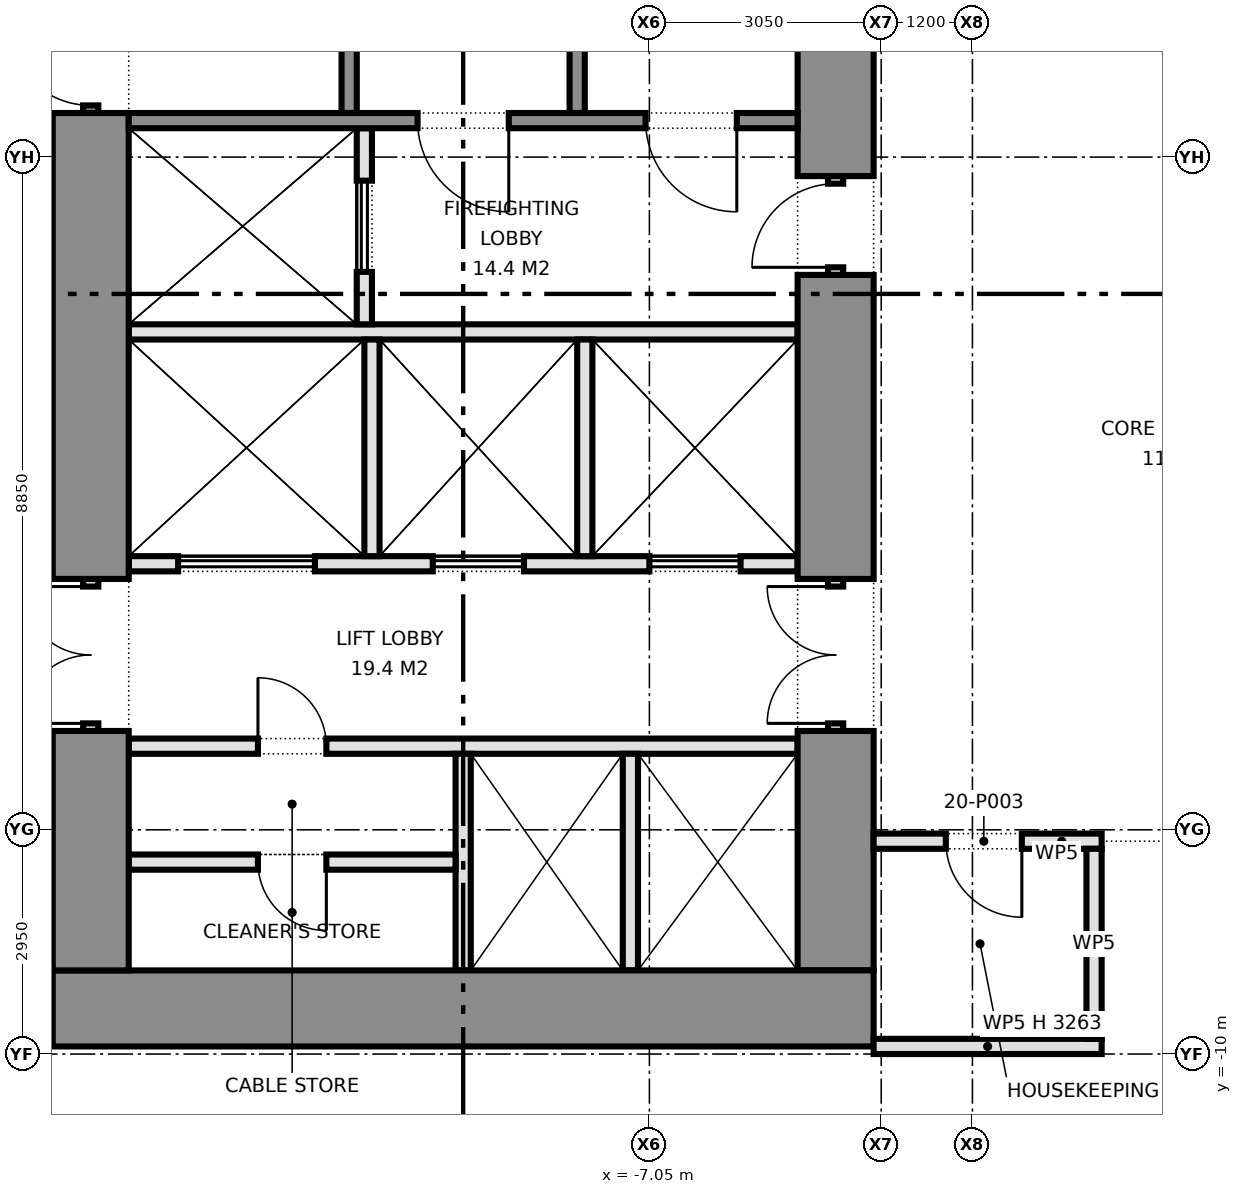
"""IFC4 building model, lengths in metres.
Left out: names, types, materials, properties, quantities, classifications, styles, units other than length and angle.
Written with IfcOpenShell. Run it as: python <this file> out.ifc"""

import sys

from ifc_helpers import new_model, si_unit, direction, frame, frame_2d, origin, place, context, subcontext, project, spatial, rectangle, extrude, element, fill, save


model = new_model("IFC4")
c1 = context("Model", 3, precision=1e-05, world=origin(), true_north=direction((0.0, 1.0)))
c2 = subcontext(c1, "Body", "Model", "MODEL_VIEW")
j1 = project(units=[si_unit("LENGTHUNIT", "METRE"), si_unit("PLANEANGLEUNIT", "RADIAN")], contexts=[c1])
p1 = place(None, origin())
s1 = spatial("IfcSite", under=j1, at=p1, CompositionType="ELEMENT")
p2 = place(p1, origin())
s2 = spatial("IfcBuilding", under=s1, at=p2, CompositionType="ELEMENT")
p3 = place(p2, frame((0.0, 0.0, 90.8)))
s3 = spatial("IfcBuildingStorey", under=s2, at=p3, CompositionType="ELEMENT", Elevation=90.8)
p4 = place(p3, frame((-14.9, -9.4, 0.0), z_axis=(0.0, 0.0, 1.0), x_axis=(1.0, 0.0, 0.0)))
e1 = element("IfcWall", 1, at=p4, inside=s3, PredefinedType="SHEAR", context=c2, shape_type="SweptSolid", body=[
    extrude(rectangle(XDim=10.8, YDim=1.0, at=frame_2d((5.4, 0.0))), origin(), (0.0, 0.0, 1.0), 4.2),
])
p5 = place(p3, frame((-14.4, -8.9, 0.0), z_axis=(0.0, 0.0, 1.0), x_axis=(0.0, 1.0, 0.0)))
e2 = element("IfcWall", 2, at=p5, inside=s3, PredefinedType="SHEAR", context=c2, shape_type="SweptSolid", body=[
    extrude(rectangle(XDim=3.15, YDim=1.0, at=frame_2d((1.575, 0.0))), origin(), (0.0, 0.0, 1.0), 4.2),
])
p6 = place(p3, frame((-14.4, -5.75, 0.0), z_axis=(0.0, 0.0, 1.0), x_axis=(0.0, 1.0, 0.0)))
e3 = element("IfcWall", 3, at=p6, inside=s3, PredefinedType="PARTITIONING", context=c2, shape_type="SweptSolid", body=[
    extrude(rectangle(XDim=2.0, YDim=0.2, at=frame_2d((1.0, 0.0))), origin(), (0.0, 0.0, 1.0), 2.4),
])
p7 = place(p6, frame((0.1, 0.0, 0.0)))
e4 = element("IfcOpeningElement", 4, at=p7, cuts=e3, PredefinedType="OPENING", context=c2, shape_type="SweptSolid", body=[
    extrude(rectangle(XDim=1.8, YDim=2.1, at=frame_2d((0.9, 1.05))), frame((0.0, 0.11, 0.0), z_axis=(0.0, -1.0, 0.0), x_axis=(1.0, 0.0, 0.0)), (0.0, 0.0, 1.0), 0.22),
])
p8 = place(p3, frame((-14.4, -3.75, 0.0), z_axis=(0.0, 0.0, 1.0), x_axis=(0.0, 1.0, 0.0)))
e5 = element("IfcWall", 5, at=p8, inside=s3, PredefinedType="SHEAR", context=c2, shape_type="SweptSolid", body=[
    extrude(rectangle(XDim=6.13, YDim=1.0, at=frame_2d((3.065, 0.0))), origin(), (0.0, 0.0, 1.0), 4.2),
])
p9 = place(p3, frame((-14.4, 2.38, 0.0), z_axis=(0.0, 0.0, 1.0), x_axis=(0.0, 1.0, 0.0)))
e6 = element("IfcWall", 6, at=p9, inside=s3, PredefinedType="SHEAR", context=c2, shape_type="SweptSolid", body=[
    extrude(rectangle(XDim=1.3, YDim=0.2, at=frame_2d((0.65, 0.0))), origin(), (0.0, 0.0, 1.0), 2.4),
])
p10 = place(p9, frame((0.1, 0.0, 0.0)))
e7 = element("IfcOpeningElement", 7, at=p10, cuts=e6, PredefinedType="OPENING", context=c2, shape_type="SweptSolid", body=[
    extrude(rectangle(XDim=1.1, YDim=2.1, at=frame_2d((0.55, 1.05))), frame((0.0, 0.11, 0.0), z_axis=(0.0, -1.0, 0.0), x_axis=(1.0, 0.0, 0.0)), (0.0, 0.0, 1.0), 0.22),
])
p11 = place(p3, frame((-4.6, -8.9, 0.0), z_axis=(0.0, 0.0, 1.0), x_axis=(0.0, 1.0, 0.0)))
e8 = element("IfcWall", 8, at=p11, inside=s3, PredefinedType="SHEAR", context=c2, shape_type="SweptSolid", body=[
    extrude(rectangle(XDim=3.15, YDim=1.0, at=frame_2d((1.575, 0.0))), origin(), (0.0, 0.0, 1.0), 4.2),
])
p12 = place(p3, frame((-4.6, -5.75, 0.0), z_axis=(0.0, 0.0, 1.0), x_axis=(0.0, 1.0, 0.0)))
e9 = element("IfcWall", 9, at=p12, inside=s3, PredefinedType="PARTITIONING", context=c2, shape_type="SweptSolid", body=[
    extrude(rectangle(XDim=2.0, YDim=0.2, at=frame_2d((1.0, 0.0))), origin(), (0.0, 0.0, 1.0), 2.4),
])
p13 = place(p12, frame((0.1, 0.0, 0.0)))
e10 = element("IfcOpeningElement", 10, at=p13, cuts=e9, PredefinedType="OPENING", context=c2, shape_type="SweptSolid", body=[
    extrude(rectangle(XDim=1.8, YDim=2.1, at=frame_2d((0.9, 1.05))), frame((0.0, 0.11, 0.0), z_axis=(0.0, -1.0, 0.0), x_axis=(1.0, 0.0, 0.0)), (0.0, 0.0, 1.0), 0.22),
])
p14 = place(p3, frame((-4.6, -3.75, 0.0), z_axis=(0.0, 0.0, 1.0), x_axis=(0.0, 1.0, 0.0)))
e11 = element("IfcWall", 11, at=p14, inside=s3, PredefinedType="SHEAR", context=c2, shape_type="SweptSolid", body=[
    extrude(rectangle(XDim=4.0, YDim=1.0, at=frame_2d((2.0, 0.0))), origin(), (0.0, 0.0, 1.0), 4.2),
])
p15 = place(p3, frame((-4.6, 0.25, 0.0), z_axis=(0.0, 0.0, 1.0), x_axis=(0.0, 1.0, 0.0)))
e12 = element("IfcWall", 12, at=p15, inside=s3, PredefinedType="PARTITIONING", context=c2, shape_type="SweptSolid", body=[
    extrude(rectangle(XDim=1.3, YDim=0.2, at=frame_2d((0.65, 0.0))), origin(), (0.0, 0.0, 1.0), 2.4),
])
p16 = place(p15, frame((0.1, 0.0, 0.0)))
e13 = element("IfcOpeningElement", 13, at=p16, cuts=e12, PredefinedType="OPENING", context=c2, shape_type="SweptSolid", body=[
    extrude(rectangle(XDim=1.1, YDim=2.1, at=frame_2d((0.55, 1.05))), frame((0.0, 0.11, 0.0), z_axis=(0.0, -1.0, 0.0), x_axis=(1.0, 0.0, 0.0)), (0.0, 0.0, 1.0), 0.22),
])
p17 = place(p3, frame((-4.6, 1.55, 0.0), z_axis=(0.0, 0.0, 1.0), x_axis=(0.0, 1.0, 0.0)))
e14 = element("IfcWall", 14, at=p17, inside=s3, PredefinedType="SHEAR", context=c2, shape_type="SweptSolid", body=[
    extrude(rectangle(XDim=7.35, YDim=1.0, at=frame_2d((3.675, 0.0))), origin(), (0.0, 0.0, 1.0), 4.2),
])
p18 = place(p3, frame((-13.9, -5.95, 0.0), z_axis=(0.0, 0.0, 1.0), x_axis=(1.0, 0.0, 0.0)))
e15 = element("IfcWall", 15, at=p18, inside=s3, PredefinedType="PARTITIONING", context=c2, shape_type="SweptSolid", body=[
    extrude(rectangle(XDim=8.8, YDim=0.2, at=frame_2d((4.4, 0.0))), origin(), (0.0, 0.0, 1.0), 4.2),
])
p19 = place(p18, frame((1.7, 0.0, 0.0)))
e16 = element("IfcOpeningElement", 16, at=p19, cuts=e15, PredefinedType="OPENING", context=c2, shape_type="SweptSolid", body=[
    extrude(rectangle(XDim=0.9, YDim=2.1, at=frame_2d((0.45, 1.05))), frame((0.0, 0.11, 0.0), z_axis=(0.0, -1.0, 0.0), x_axis=(1.0, 0.0, 0.0)), (0.0, 0.0, 1.0), 0.22),
])
p20 = place(p3, frame((-13.9, -3.55, 0.0), z_axis=(0.0, 0.0, 1.0), x_axis=(1.0, 0.0, 0.0)))
e17 = element("IfcWall", 17, at=p20, inside=s3, PredefinedType="PARTITIONING", context=c2, shape_type="SweptSolid", body=[
    extrude(rectangle(XDim=8.8, YDim=0.2, at=frame_2d((4.4, 0.0))), origin(), (0.0, 0.0, 1.0), 4.2),
])
p21 = place(p20, frame((0.65, 0.0, 0.0)))
e18 = element("IfcOpeningElement", 18, at=p21, cuts=e17, PredefinedType="OPENING", context=c2, shape_type="SweptSolid", body=[
    extrude(rectangle(XDim=1.8, YDim=2.1, at=frame_2d((0.9, 1.05))), frame((0.0, 0.11, 0.0), z_axis=(0.0, -1.0, 0.0), x_axis=(1.0, 0.0, 0.0)), (0.0, 0.0, 1.0), 0.22),
])
p22 = place(p20, frame((4.0, 0.0, 0.0)))
e19 = element("IfcOpeningElement", 19, at=p22, cuts=e17, PredefinedType="OPENING", context=c2, shape_type="SweptSolid", body=[
    extrude(rectangle(XDim=1.2, YDim=2.1, at=frame_2d((0.6, 1.05))), frame((0.0, 0.11, 0.0), z_axis=(0.0, -1.0, 0.0), x_axis=(1.0, 0.0, 0.0)), (0.0, 0.0, 1.0), 0.22),
])
p23 = place(p20, frame((6.85, 0.0, 0.0)))
e20 = element("IfcOpeningElement", 20, at=p23, cuts=e17, PredefinedType="OPENING", context=c2, shape_type="SweptSolid", body=[
    extrude(rectangle(XDim=1.2, YDim=2.1, at=frame_2d((0.6, 1.05))), frame((0.0, 0.11, 0.0), z_axis=(0.0, -1.0, 0.0), x_axis=(1.0, 0.0, 0.0)), (0.0, 0.0, 1.0), 0.22),
])
p24 = place(p3, frame((-13.9, -0.5, 0.0), z_axis=(0.0, 0.0, 1.0), x_axis=(1.0, 0.0, 0.0)))
e21 = element("IfcWall", 21, at=p24, inside=s3, PredefinedType="PARTITIONING", context=c2, shape_type="SweptSolid", body=[
    extrude(rectangle(XDim=8.8, YDim=0.2, at=frame_2d((4.4, 0.0))), origin(), (0.0, 0.0, 1.0), 4.2),
])
p25 = place(p3, frame((-10.8, -0.4, 0.0), z_axis=(0.0, 0.0, 1.0), x_axis=(0.0, 1.0, 0.0)))
e22 = element("IfcWall", 22, at=p25, inside=s3, PredefinedType="PARTITIONING", context=c2, shape_type="SweptSolid", body=[
    extrude(rectangle(XDim=2.58, YDim=0.2, at=frame_2d((1.29, 0.0))), origin(), (0.0, 0.0, 1.0), 4.2),
])
p26 = place(p25, frame((0.69, 0.0, 0.0)))
e23 = element("IfcOpeningElement", 23, at=p26, cuts=e22, PredefinedType="OPENING", context=c2, shape_type="SweptSolid", body=[
    extrude(rectangle(XDim=1.2, YDim=2.1, at=frame_2d((0.6, 1.05))), frame((0.0, 0.11, 0.0), z_axis=(0.0, -1.0, 0.0), x_axis=(1.0, 0.0, 0.0)), (0.0, 0.0, 1.0), 0.22),
])
p27 = place(p3, frame((-13.9, 2.28, 0.0), z_axis=(0.0, 0.0, 1.0), x_axis=(1.0, 0.0, 0.0)))
e24 = element("IfcWall", 24, at=p27, inside=s3, PredefinedType="SHEAR", context=c2, shape_type="SweptSolid", body=[
    extrude(rectangle(XDim=8.8, YDim=0.2, at=frame_2d((4.4, 0.0))), origin(), (0.0, 0.0, 1.0), 4.2),
])
p28 = place(p27, frame((3.8, 0.0, 0.0)))
e25 = element("IfcOpeningElement", 25, at=p28, cuts=e24, PredefinedType="OPENING", context=c2, shape_type="SweptSolid", body=[
    extrude(rectangle(XDim=1.2, YDim=2.1, at=frame_2d((0.6, 1.05))), frame((0.0, 0.11, 0.0), z_axis=(0.0, -1.0, 0.0), x_axis=(1.0, 0.0, 0.0)), (0.0, 0.0, 1.0), 0.22),
])
p29 = place(p27, frame((6.8, 0.0, 0.0)))
e26 = element("IfcOpeningElement", 26, at=p29, cuts=e24, PredefinedType="OPENING", context=c2, shape_type="SweptSolid", body=[
    extrude(rectangle(XDim=1.2, YDim=2.1, at=frame_2d((0.6, 1.05))), frame((0.0, 0.11, 0.0), z_axis=(0.0, -1.0, 0.0), x_axis=(1.0, 0.0, 0.0)), (0.0, 0.0, 1.0), 0.22),
])
for number, where, z_axis, x_axis in (
    (27, (-11.0, 2.38, 0.0), (0.0, 0.0, 1.0), (0.0, 1.0, 0.0)),
    (28, (-8.0, 2.38, 0.0), (0.0, 0.0, 1.0), (0.0, 1.0, 0.0)),
):
    element("IfcWall", number, at=place(p3, frame(where, z_axis=z_axis, x_axis=x_axis)), inside=s3, PredefinedType="SHEAR", context=c2, shape_type="SweptSolid", body=[
        extrude(rectangle(XDim=6.52, YDim=0.2, at=frame_2d((3.26, 0.0))), origin(), (0.0, 0.0, 1.0), 4.2),
    ])
for number, where, z_axis, x_axis in (
    (29, (-9.5, -8.9, 0.0), (0.0, 0.0, 1.0), (0.0, 1.0, 0.0)),
    (30, (-7.3, -8.9, 0.0), (0.0, 0.0, 1.0), (0.0, 1.0, 0.0)),
):
    element("IfcWall", number, at=place(p3, frame(where, z_axis=z_axis, x_axis=x_axis)), inside=s3, PredefinedType="PARTITIONING", context=c2, shape_type="SweptSolid", body=[
        extrude(rectangle(XDim=2.85, YDim=0.2, at=frame_2d((1.425, 0.0))), origin(), (0.0, 0.0, 1.0), 4.2),
    ])
p30 = place(p3, frame((-13.9, -7.475, 0.0), z_axis=(0.0, 0.0, 1.0), x_axis=(1.0, 0.0, 0.0)))
e31 = element("IfcWall", 31, at=p30, inside=s3, PredefinedType="PARTITIONING", context=c2, shape_type="SweptSolid", body=[
    extrude(rectangle(XDim=4.3, YDim=0.2, at=frame_2d((2.15, 0.0))), origin(), (0.0, 0.0, 1.0), 4.2),
])
p31 = place(p30, frame((1.7, 0.0, 0.0)))
e32 = element("IfcOpeningElement", 32, at=p31, cuts=e31, PredefinedType="OPENING", context=c2, shape_type="SweptSolid", body=[
    extrude(rectangle(XDim=0.9, YDim=2.1, at=frame_2d((0.45, 1.05))), frame((0.0, 0.11, 0.0), z_axis=(0.0, -1.0, 0.0), x_axis=(1.0, 0.0, 0.0)), (0.0, 0.0, 1.0), 0.22),
])
for number, where, z_axis, x_axis in (
    (33, (-10.7, -3.45, 0.0), (0.0, 0.0, 1.0), (0.0, 1.0, 0.0)),
    (34, (-7.9, -3.45, 0.0), (0.0, 0.0, 1.0), (0.0, 1.0, 0.0)),
):
    element("IfcWall", number, at=place(p3, frame(where, z_axis=z_axis, x_axis=x_axis)), inside=s3, PredefinedType="PARTITIONING", context=c2, shape_type="SweptSolid", body=[
        extrude(rectangle(XDim=2.85, YDim=0.2, at=frame_2d((1.425, 0.0))), origin(), (0.0, 0.0, 1.0), 4.2),
    ])
p32 = place(p3, frame((-4.1, -9.9, 0.0), z_axis=(0.0, 0.0, 1.0), x_axis=(1.0, 0.0, 0.0)))
e35 = element("IfcWall", 35, at=p32, inside=s3, PredefinedType="PARTITIONING", context=c2, shape_type="SweptSolid", body=[
    extrude(rectangle(XDim=3.0, YDim=0.2, at=frame_2d((1.5, 0.0))), origin(), (0.0, 0.0, 1.0), 3.263),
])
p33 = place(p3, frame((-4.1, -7.2, 0.0), z_axis=(0.0, 0.0, 1.0), x_axis=(1.0, 0.0, 0.0)))
e36 = element("IfcWall", 36, at=p33, inside=s3, PredefinedType="PARTITIONING", context=c2, shape_type="SweptSolid", body=[
    extrude(rectangle(XDim=3.0, YDim=0.2, at=frame_2d((1.5, 0.0))), origin(), (0.0, 0.0, 1.0), 4.2),
])
p34 = place(p33, frame((0.95, 0.0, 0.0)))
e37 = element("IfcOpeningElement", 37, at=p34, cuts=e36, PredefinedType="OPENING", context=c2, shape_type="SweptSolid", body=[
    extrude(rectangle(XDim=1.0, YDim=2.1, at=frame_2d((0.5, 1.05))), frame((0.0, 0.11, 0.0), z_axis=(0.0, -1.0, 0.0), x_axis=(1.0, 0.0, 0.0)), (0.0, 0.0, 1.0), 0.22),
])
p35 = place(p3, frame((-1.2, -9.8, 0.0), z_axis=(0.0, 0.0, 1.0), x_axis=(0.0, 1.0, 0.0)))
e38 = element("IfcWall", 38, at=p35, inside=s3, PredefinedType="PARTITIONING", context=c2, shape_type="SweptSolid", body=[
    extrude(rectangle(XDim=2.5, YDim=0.2, at=frame_2d((1.25, 0.0))), origin(), (0.0, 0.0, 1.0), 4.2),
])
p36 = place(p7, origin())
e39 = element("IfcDoor", 39, at=p36, inside=s3, OperationType="DOUBLE_DOOR_SINGLE_SWING", PredefinedType="DOOR", context=c2, shape_type="SweptSolid", body=[
    extrude(rectangle(XDim=1.8, YDim=2.1, at=frame_2d((0.9, 1.05))), frame((0.0, 0.025, 0.0), z_axis=(0.0, -1.0, 0.0), x_axis=(1.0, 0.0, 0.0)), (0.0, 0.0, 1.0), 0.05),
])
fill(e4, e39)
p37 = place(p10, origin())
e40 = element("IfcDoor", 40, at=p37, inside=s3, OperationType="SINGLE_SWING_RIGHT", PredefinedType="DOOR", context=c2, shape_type="SweptSolid", body=[
    extrude(rectangle(XDim=1.1, YDim=2.1, at=frame_2d((0.55, 1.05))), frame((0.0, 0.025, 0.0), z_axis=(0.0, -1.0, 0.0), x_axis=(1.0, 0.0, 0.0)), (0.0, 0.0, 1.0), 0.05),
])
fill(e7, e40)
p38 = place(p13, origin())
e41 = element("IfcDoor", 41, at=p38, inside=s3, OperationType="DOUBLE_DOOR_SINGLE_SWING", PredefinedType="DOOR", context=c2, shape_type="SweptSolid", body=[
    extrude(rectangle(XDim=1.8, YDim=2.1, at=frame_2d((0.9, 1.05))), frame((0.0, 0.025, 0.0), z_axis=(0.0, -1.0, 0.0), x_axis=(1.0, 0.0, 0.0)), (0.0, 0.0, 1.0), 0.05),
])
fill(e10, e41)
p39 = place(p16, origin())
e42 = element("IfcDoor", 42, at=p39, inside=s3, OperationType="SINGLE_SWING_LEFT", PredefinedType="DOOR", context=c2, shape_type="SweptSolid", body=[
    extrude(rectangle(XDim=1.1, YDim=2.1, at=frame_2d((0.55, 1.05))), frame((0.0, 0.025, 0.0), z_axis=(0.0, -1.0, 0.0), x_axis=(1.0, 0.0, 0.0)), (0.0, 0.0, 1.0), 0.05),
])
fill(e13, e42)
p40 = place(p21, origin())
e43 = element("IfcDoor", 43, at=p40, inside=s3, OperationType="DOUBLE_DOOR_SLIDING", PredefinedType="DOOR", context=c2, shape_type="SweptSolid", body=[
    extrude(rectangle(XDim=1.8, YDim=2.1, at=frame_2d((0.9, 1.05))), frame((0.0, 0.025, 0.0), z_axis=(0.0, -1.0, 0.0), x_axis=(1.0, 0.0, 0.0)), (0.0, 0.0, 1.0), 0.05),
])
fill(e18, e43)
p41 = place(p22, origin())
e44 = element("IfcDoor", 44, at=p41, inside=s3, OperationType="DOUBLE_DOOR_SLIDING", PredefinedType="DOOR", context=c2, shape_type="SweptSolid", body=[
    extrude(rectangle(XDim=1.2, YDim=2.1, at=frame_2d((0.6, 1.05))), frame((0.0, 0.025, 0.0), z_axis=(0.0, -1.0, 0.0), x_axis=(1.0, 0.0, 0.0)), (0.0, 0.0, 1.0), 0.05),
])
fill(e19, e44)
p42 = place(p23, origin())
e45 = element("IfcDoor", 45, at=p42, inside=s3, OperationType="DOUBLE_DOOR_SLIDING", PredefinedType="DOOR", context=c2, shape_type="SweptSolid", body=[
    extrude(rectangle(XDim=1.2, YDim=2.1, at=frame_2d((0.6, 1.05))), frame((0.0, 0.025, 0.0), z_axis=(0.0, -1.0, 0.0), x_axis=(1.0, 0.0, 0.0)), (0.0, 0.0, 1.0), 0.05),
])
fill(e20, e45)
p43 = place(p26, origin())
e46 = element("IfcDoor", 46, at=p43, inside=s3, OperationType="DOUBLE_DOOR_SLIDING", PredefinedType="DOOR", context=c2, shape_type="SweptSolid", body=[
    extrude(rectangle(XDim=1.2, YDim=2.1, at=frame_2d((0.6, 1.05))), frame((0.0, 0.025, 0.0), z_axis=(0.0, -1.0, 0.0), x_axis=(1.0, 0.0, 0.0)), (0.0, 0.0, 1.0), 0.05),
])
fill(e23, e46)
p44 = place(p19, origin())
e47 = element("IfcDoor", 47, at=p44, inside=s3, OperationType="SINGLE_SWING_LEFT", PredefinedType="DOOR", context=c2, shape_type="SweptSolid", body=[
    extrude(rectangle(XDim=0.9, YDim=2.1, at=frame_2d((0.45, 1.05))), frame((0.0, 0.025, 0.0), z_axis=(0.0, -1.0, 0.0), x_axis=(1.0, 0.0, 0.0)), (0.0, 0.0, 1.0), 0.05),
])
fill(e16, e47)
p45 = place(p31, frame((0.9, 0.0, 0.0), z_axis=(0.0, 0.0, 1.0), x_axis=(-1.0, 0.0, 0.0)))
e48 = element("IfcDoor", 48, at=p45, inside=s3, OperationType="SINGLE_SWING_LEFT", PredefinedType="DOOR", context=c2, shape_type="SweptSolid", body=[
    extrude(rectangle(XDim=0.9, YDim=2.1, at=frame_2d((0.45, 1.05))), frame((0.0, 0.025, 0.0), z_axis=(0.0, -1.0, 0.0), x_axis=(1.0, 0.0, 0.0)), (0.0, 0.0, 1.0), 0.05),
])
fill(e32, e48)
p46 = place(p28, frame((1.2, 0.0, 0.0), z_axis=(0.0, 0.0, 1.0), x_axis=(-1.0, 0.0, 0.0)))
e49 = element("IfcDoor", 49, at=p46, inside=s3, OperationType="SINGLE_SWING_LEFT", PredefinedType="DOOR", context=c2, shape_type="SweptSolid", body=[
    extrude(rectangle(XDim=1.2, YDim=2.1, at=frame_2d((0.6, 1.05))), frame((0.0, 0.025, 0.0), z_axis=(0.0, -1.0, 0.0), x_axis=(1.0, 0.0, 0.0)), (0.0, 0.0, 1.0), 0.05),
])
fill(e25, e49)
p47 = place(p29, frame((1.2, 0.0, 0.0), z_axis=(0.0, 0.0, 1.0), x_axis=(-1.0, 0.0, 0.0)))
e50 = element("IfcDoor", 50, at=p47, inside=s3, OperationType="SINGLE_SWING_LEFT", PredefinedType="DOOR", context=c2, shape_type="SweptSolid", body=[
    extrude(rectangle(XDim=1.2, YDim=2.1, at=frame_2d((0.6, 1.05))), frame((0.0, 0.025, 0.0), z_axis=(0.0, -1.0, 0.0), x_axis=(1.0, 0.0, 0.0)), (0.0, 0.0, 1.0), 0.05),
])
fill(e26, e50)
p48 = place(p34, frame((1.0, 0.0, 0.0), z_axis=(0.0, 0.0, 1.0), x_axis=(-1.0, 0.0, 0.0)))
e51 = element("IfcDoor", 51, at=p48, inside=s3, OperationType="SINGLE_SWING_LEFT", PredefinedType="DOOR", context=c2, shape_type="SweptSolid", body=[
    extrude(rectangle(XDim=1.0, YDim=2.1, at=frame_2d((0.5, 1.05))), frame((0.0, 0.025, 0.0), z_axis=(0.0, -1.0, 0.0), x_axis=(1.0, 0.0, 0.0)), (0.0, 0.0, 1.0), 0.05),
])
fill(e37, e51)
save(model, sys.argv[1])
